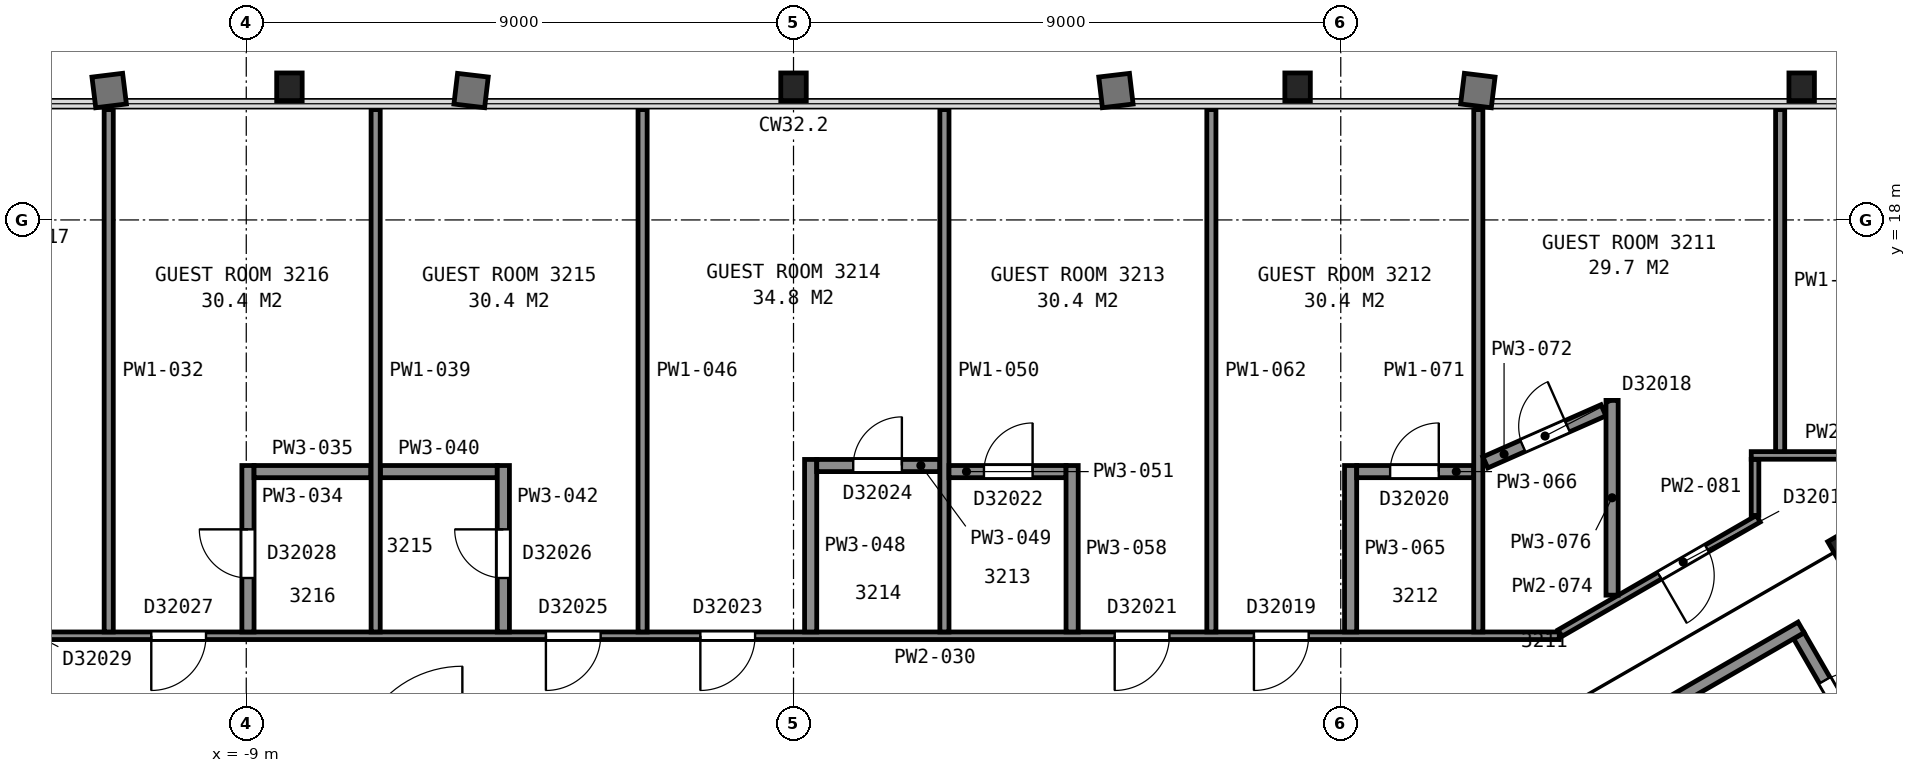
"""IFC4 building model, lengths in metres.
Left out: names, types, materials, properties, quantities, classifications, styles, units other than length and angle.
Written with IfcOpenShell. Run it as: python <this file> out.ifc"""

import sys

from ifc_helpers import new_model, si_unit, direction, frame, frame_2d, origin, origin_2d, place, context, subcontext, project, spatial, rectangle, i_section, extrude, element, fill, save


model = new_model("IFC4")
c1 = context("Model", 3, precision=1e-05, world=origin(), true_north=direction((0.0, 1.0)))
c2 = subcontext(c1, "Body", "Model", "MODEL_VIEW")
j1 = project(units=[si_unit("LENGTHUNIT", "METRE"), si_unit("PLANEANGLEUNIT", "RADIAN")], contexts=[c1])
p1 = place(None, origin())
s1 = spatial("IfcSite", under=j1, at=p1, CompositionType="ELEMENT")
p2 = place(p1, origin())
s2 = spatial("IfcBuilding", under=s1, at=p2, CompositionType="ELEMENT")
p3 = place(p2, frame((0.0, 0.0, 132.4)))
s3 = spatial("IfcBuildingStorey", under=s2, at=p3, CompositionType="ELEMENT", Elevation=132.4)
for number, where, z_axis, x_axis in (
    (1, (16.58, 20.19, 0.04), (0.0, 0.0, 1.0), (1.0, 0.0, 0.0)),
    (2, (8.29, 20.19, 0.04), (0.0, 0.0, 1.0), (1.0, 0.0, 0.0)),
):
    element("IfcColumn", number, at=place(p3, frame(where, z_axis=z_axis, x_axis=x_axis)), inside=s3, PredefinedType="COLUMN", context=c2, shape_type="SweptSolid", body=[
        extrude(i_section(OverallWidth=0.419, OverallDepth=0.455, WebThickness=0.042, FlangeThickness=0.068, FilletRadius=0.015, at=origin_2d()), origin(), (0.0, 0.0, 1.0), 3.56),
    ])
p4 = place(p3, frame((0.0, 20.19, 0.035), z_axis=(0.0, 0.0, 1.0), x_axis=(1.0, 0.0, 0.0)))
e3 = element("IfcColumn", 3, at=p4, inside=s3, PredefinedType="COLUMN", context=c2, shape_type="SweptSolid", body=[
    extrude(i_section(OverallWidth=0.419, OverallDepth=0.455, WebThickness=0.042, FlangeThickness=0.068, FilletRadius=0.015, at=origin_2d()), origin(), (0.0, 0.0, 1.0), 3.565),
])
p5 = place(p3, frame((-8.29, 20.19, 0.04), z_axis=(0.0, 0.0, 1.0), x_axis=(1.0, 0.0, 0.0)))
e4 = element("IfcColumn", 4, at=p5, inside=s3, PredefinedType="COLUMN", context=c2, shape_type="SweptSolid", body=[
    extrude(i_section(OverallWidth=0.419, OverallDepth=0.455, WebThickness=0.042, FlangeThickness=0.068, FilletRadius=0.015, at=origin_2d()), origin(), (0.0, 0.0, 1.0), 3.56),
])
p6 = place(p3, frame((17.3, 12.64, 0.0), z_axis=(0.0, 0.0, 1.0), x_axis=(0.5, -0.866025403784, 0.0)))
e5 = element("IfcColumn", 5, at=p6, inside=s3, PredefinedType="COLUMN", context=c2, shape_type="SweptSolid", body=[
    extrude(i_section(OverallWidth=0.411, OverallDepth=0.434, WebThickness=0.036, FlangeThickness=0.057, FilletRadius=0.015, at=origin_2d()), origin(), (0.0, 0.0, 1.0), 3.6),
])
p7 = place(p3, frame((17.934, 8.738, 0.0), z_axis=(0.0, 0.0, 1.0), x_axis=(-0.49998411664, 0.866034573852, 0.0)))
e6 = element("IfcWall", 6, at=p7, inside=s3, PredefinedType="PARTITIONING", context=c2, shape_type="SweptSolid", body=[
    extrude(rectangle(XDim=2.8, YDim=0.2, at=frame_2d((1.4, 0.0))), origin(), (0.0, 0.0, 1.0), 3.35),
])
p8 = place(p7, frame((0.85, 0.0, 0.0)))
e7 = element("IfcOpeningElement", 7, at=p8, cuts=e6, PredefinedType="OPENING", context=c2, shape_type="SweptSolid", body=[
    extrude(rectangle(XDim=1.1, YDim=2.1, at=frame_2d((0.55, 1.05))), frame((0.0, 0.11, 0.0), z_axis=(0.0, -1.0, 0.0), x_axis=(1.0, 0.0, 0.0)), (0.0, 0.0, 1.0), 0.22),
])
for number, where, z_axis, x_axis in (
    (8, (6.178, 5.299, 0.0), (0.0, 0.0, 1.0), (0.866, 0.5, 0.0)),
    (9, (-6.178, 5.299, 0.0), (0.0, 0.0, 1.0), (-0.866, 0.5, 0.0)),
):
    element("IfcWall", number, at=place(p3, frame(where, z_axis=z_axis, x_axis=x_axis)), inside=s3, PredefinedType="PARTITIONING", context=c2, shape_type="SweptSolid", body=[
        extrude(rectangle(XDim=12.0, YDim=0.2, at=frame_2d((6.0, 0.0))), origin(), (0.0, 0.0, 1.0), 3.35),
    ])
p9 = place(p3, frame((-12.594, 11.161, 0.0), z_axis=(0.0, 0.0, 1.0), x_axis=(1.0, 0.0, 0.0)))
e10 = element("IfcWall", 10, at=p9, inside=s3, PredefinedType="PARTITIONING", context=c2, shape_type="SweptSolid", body=[
    extrude(rectangle(XDim=25.187, YDim=0.125, at=frame_2d((12.594, 0.0))), origin(), (0.0, 0.0, 1.0), 2.613),
])
p10 = place(p9, frame((20.166, 0.0, 0.0)))
e11 = element("IfcOpeningElement", 11, at=p10, cuts=e10, PredefinedType="OPENING", context=c2, shape_type="SweptSolid", body=[
    extrude(rectangle(XDim=0.9, YDim=2.1, at=frame_2d((0.45, 1.05))), frame((0.0, 0.073, 0.0), z_axis=(0.0, -1.0, 0.0), x_axis=(1.0, 0.0, 0.0)), (0.0, 0.0, 1.0), 0.145),
])
p11 = place(p9, frame((17.875, 0.0, 0.0)))
e12 = element("IfcOpeningElement", 12, at=p11, cuts=e10, PredefinedType="OPENING", context=c2, shape_type="SweptSolid", body=[
    extrude(rectangle(XDim=0.9, YDim=2.1, at=frame_2d((0.45, 1.05))), frame((0.0, 0.073, 0.0), z_axis=(0.0, -1.0, 0.0), x_axis=(1.0, 0.0, 0.0)), (0.0, 0.0, 1.0), 0.145),
])
p12 = place(p9, frame((11.062, 0.0, 0.0)))
e13 = element("IfcOpeningElement", 13, at=p12, cuts=e10, PredefinedType="OPENING", context=c2, shape_type="SweptSolid", body=[
    extrude(rectangle(XDim=0.9, YDim=2.1, at=frame_2d((0.45, 1.05))), frame((0.0, 0.073, 0.0), z_axis=(0.0, -1.0, 0.0), x_axis=(1.0, 0.0, 0.0)), (0.0, 0.0, 1.0), 0.145),
])
p13 = place(p9, frame((8.521, 0.0, 0.0)))
e14 = element("IfcOpeningElement", 14, at=p13, cuts=e10, PredefinedType="OPENING", context=c2, shape_type="SweptSolid", body=[
    extrude(rectangle(XDim=0.9, YDim=2.1, at=frame_2d((0.45, 1.05))), frame((0.0, 0.073, 0.0), z_axis=(0.0, -1.0, 0.0), x_axis=(1.0, 0.0, 0.0)), (0.0, 0.0, 1.0), 0.145),
])
p14 = place(p9, frame((2.031, 0.0, 0.0)))
e15 = element("IfcOpeningElement", 15, at=p14, cuts=e10, PredefinedType="OPENING", context=c2, shape_type="SweptSolid", body=[
    extrude(rectangle(XDim=0.9, YDim=2.1, at=frame_2d((0.45, 1.05))), frame((0.0, 0.073, 0.0), z_axis=(0.0, -1.0, 0.0), x_axis=(1.0, 0.0, 0.0)), (0.0, 0.0, 1.0), 0.145),
])
p15 = place(p3, frame((-11.262, 11.223, 0.0), z_axis=(0.0, 0.0, 1.0), x_axis=(0.0, 1.0, 0.0)))
e16 = element("IfcWall", 16, at=p15, inside=s3, PredefinedType="PARTITIONING", context=c2, shape_type="SweptSolid", body=[
    extrude(rectangle(XDim=8.592, YDim=0.15, at=frame_2d((4.296, 0.0))), origin(), (0.0, 0.0, 1.0), 2.613),
])
p16 = place(p3, frame((-8.972, 13.961, 0.0), z_axis=(0.0, 0.0, 1.0), x_axis=(0.0, -1.0, 0.0)))
e17 = element("IfcWall", 17, at=p16, inside=s3, PredefinedType="PARTITIONING", context=c2, shape_type="SweptSolid", body=[
    extrude(rectangle(XDim=2.738, YDim=0.2, at=frame_2d((1.369, 0.0))), origin(), (0.0, 0.0, 1.0), 2.613),
])
p17 = place(p16, frame((1.05, 0.0, 0.0)))
e18 = element("IfcOpeningElement", 18, at=p17, cuts=e17, PredefinedType="OPENING", context=c2, shape_type="SweptSolid", body=[
    extrude(rectangle(XDim=0.8, YDim=2.1, at=frame_2d((0.4, 1.05))), frame((0.0, 0.11, 0.0), z_axis=(0.0, -1.0, 0.0), x_axis=(1.0, 0.0, 0.0)), (0.0, 0.0, 1.0), 0.22),
])
p18 = place(p3, frame((-8.872, 13.861, 0.0), z_axis=(0.0, 0.0, 1.0), x_axis=(1.0, 0.0, 0.0)))
e19 = element("IfcWall", 19, at=p18, inside=s3, PredefinedType="PARTITIONING", context=c2, shape_type="SweptSolid", body=[
    extrude(rectangle(XDim=1.92, YDim=0.2, at=frame_2d((0.96, 0.0))), origin(), (0.0, 0.0, 1.0), 2.613),
])
p19 = place(p3, frame((-6.872, 11.223, 0.0), z_axis=(0.0, 0.0, 1.0), x_axis=(0.0, 1.0, 0.0)))
e20 = element("IfcWall", 20, at=p19, inside=s3, PredefinedType="PARTITIONING", context=c2, shape_type="SweptSolid", body=[
    extrude(rectangle(XDim=8.592, YDim=0.15, at=frame_2d((4.296, 0.0))), origin(), (0.0, 0.0, 1.0), 2.613),
])
p20 = place(p3, frame((-6.792, 13.861, 0.0), z_axis=(0.0, 0.0, 1.0), x_axis=(1.0, 0.0, 0.0)))
e21 = element("IfcWall", 21, at=p20, inside=s3, PredefinedType="PARTITIONING", context=c2, shape_type="SweptSolid", body=[
    extrude(rectangle(XDim=1.92, YDim=0.2, at=frame_2d((0.96, 0.0))), origin(), (0.0, 0.0, 1.0), 2.613),
])
p21 = place(p3, frame((-4.772, 11.223, 0.0), z_axis=(0.0, 0.0, 1.0), x_axis=(0.0, 1.0, 0.0)))
e22 = element("IfcWall", 22, at=p21, inside=s3, PredefinedType="PARTITIONING", context=c2, shape_type="SweptSolid", body=[
    extrude(rectangle(XDim=2.738, YDim=0.2, at=frame_2d((1.369, 0.0))), origin(), (0.0, 0.0, 1.0), 2.613),
])
p22 = place(p21, frame((0.887, 0.0, 0.0)))
e23 = element("IfcOpeningElement", 23, at=p22, cuts=e22, PredefinedType="OPENING", context=c2, shape_type="SweptSolid", body=[
    extrude(rectangle(XDim=0.8, YDim=2.1, at=frame_2d((0.4, 1.05))), frame((0.0, 0.11, 0.0), z_axis=(0.0, -1.0, 0.0), x_axis=(1.0, 0.0, 0.0)), (0.0, 0.0, 1.0), 0.22),
])
p23 = place(p3, frame((-2.482, 11.223, 0.0), z_axis=(0.0, 0.0, 1.0), x_axis=(0.0, 1.0, 0.0)))
e24 = element("IfcWall", 24, at=p23, inside=s3, PredefinedType="PARTITIONING", context=c2, shape_type="SweptSolid", body=[
    extrude(rectangle(XDim=8.592, YDim=0.15, at=frame_2d((4.296, 0.0))), origin(), (0.0, 0.0, 1.0), 2.613),
])
p24 = place(p3, frame((0.282, 11.223, 0.0), z_axis=(0.0, 0.0, 1.0), x_axis=(0.0, 1.0, 0.0)))
e25 = element("IfcWall", 25, at=p24, inside=s3, PredefinedType="PARTITIONING", context=c2, shape_type="SweptSolid", body=[
    extrude(rectangle(XDim=2.838, YDim=0.2, at=frame_2d((1.419, 0.0))), origin(), (0.0, 0.0, 1.0), 2.613),
])
p25 = place(p3, frame((2.407, 13.961, 0.0), z_axis=(0.0, 0.0, 1.0), x_axis=(-1.0, 0.0, 0.0)))
e26 = element("IfcWall", 26, at=p25, inside=s3, PredefinedType="PARTITIONING", context=c2, shape_type="SweptSolid", body=[
    extrude(rectangle(XDim=2.025, YDim=0.2, at=frame_2d((1.012, 0.0))), origin(), (0.0, 0.0, 1.0), 2.613),
])
p26 = place(p25, frame((0.625, 0.0, 0.0)))
e27 = element("IfcOpeningElement", 27, at=p26, cuts=e26, PredefinedType="OPENING", context=c2, shape_type="SweptSolid", body=[
    extrude(rectangle(XDim=0.8, YDim=2.1, at=frame_2d((0.4, 1.05))), frame((0.0, 0.11, 0.0), z_axis=(0.0, -1.0, 0.0), x_axis=(1.0, 0.0, 0.0)), (0.0, 0.0, 1.0), 0.22),
])
p27 = place(p3, frame((2.482, 11.223, 0.0), z_axis=(0.0, 0.0, 1.0), x_axis=(0.0, 1.0, 0.0)))
e28 = element("IfcWall", 28, at=p27, inside=s3, PredefinedType="PARTITIONING", context=c2, shape_type="SweptSolid", body=[
    extrude(rectangle(XDim=8.592, YDim=0.15, at=frame_2d((4.296, 0.0))), origin(), (0.0, 0.0, 1.0), 2.613),
])
p28 = place(p3, frame((4.482, 13.861, 0.0), z_axis=(0.0, 0.0, 1.0), x_axis=(-1.0, 0.0, 0.0)))
e29 = element("IfcWall", 29, at=p28, inside=s3, PredefinedType="PARTITIONING", context=c2, shape_type="SweptSolid", body=[
    extrude(rectangle(XDim=1.925, YDim=0.2, at=frame_2d((0.962, 0.0))), origin(), (0.0, 0.0, 1.0), 2.613),
])
p29 = place(p28, frame((0.55, 0.0, 0.0)))
e30 = element("IfcOpeningElement", 30, at=p29, cuts=e29, PredefinedType="OPENING", context=c2, shape_type="SweptSolid", body=[
    extrude(rectangle(XDim=0.8, YDim=2.1, at=frame_2d((0.4, 1.05))), frame((0.0, 0.11, 0.0), z_axis=(0.0, -1.0, 0.0), x_axis=(1.0, 0.0, 0.0)), (0.0, 0.0, 1.0), 0.22),
])
p30 = place(p3, frame((4.582, 11.223, 0.0), z_axis=(0.0, 0.0, 1.0), x_axis=(0.0, 1.0, 0.0)))
e31 = element("IfcWall", 31, at=p30, inside=s3, PredefinedType="PARTITIONING", context=c2, shape_type="SweptSolid", body=[
    extrude(rectangle(XDim=2.738, YDim=0.2, at=frame_2d((1.369, 0.0))), origin(), (0.0, 0.0, 1.0), 2.613),
])
p31 = place(p3, frame((6.872, 11.223, 0.0), z_axis=(0.0, 0.0, 1.0), x_axis=(0.0, 1.0, 0.0)))
e32 = element("IfcWall", 32, at=p31, inside=s3, PredefinedType="PARTITIONING", context=c2, shape_type="SweptSolid", body=[
    extrude(rectangle(XDim=8.592, YDim=0.15, at=frame_2d((4.296, 0.0))), origin(), (0.0, 0.0, 1.0), 2.613),
])
p32 = place(p3, frame((9.162, 11.223, 0.0), z_axis=(0.0, 0.0, 1.0), x_axis=(0.0, 1.0, 0.0)))
e33 = element("IfcWall", 33, at=p32, inside=s3, PredefinedType="PARTITIONING", context=c2, shape_type="SweptSolid", body=[
    extrude(rectangle(XDim=2.738, YDim=0.2, at=frame_2d((1.369, 0.0))), origin(), (0.0, 0.0, 1.0), 2.613),
])
p33 = place(p3, frame((11.187, 13.861, 0.0), z_axis=(0.0, 0.0, 1.0), x_axis=(-1.0, 0.0, 0.0)))
e34 = element("IfcWall", 34, at=p33, inside=s3, PredefinedType="PARTITIONING", context=c2, shape_type="SweptSolid", body=[
    extrude(rectangle(XDim=1.925, YDim=0.2, at=frame_2d((0.962, 0.0))), origin(), (0.0, 0.0, 1.0), 2.613),
])
p34 = place(p33, frame((0.575, 0.0, 0.0)))
e35 = element("IfcOpeningElement", 35, at=p34, cuts=e34, PredefinedType="OPENING", context=c2, shape_type="SweptSolid", body=[
    extrude(rectangle(XDim=0.8, YDim=2.1, at=frame_2d((0.4, 1.05))), frame((0.0, 0.11, 0.0), z_axis=(0.0, -1.0, 0.0), x_axis=(1.0, 0.0, 0.0)), (0.0, 0.0, 1.0), 0.22),
])
p35 = place(p3, frame((11.262, 11.223, 0.0), z_axis=(0.0, 0.0, 1.0), x_axis=(0.0, 1.0, 0.0)))
e36 = element("IfcWall", 36, at=p35, inside=s3, PredefinedType="PARTITIONING", context=c2, shape_type="SweptSolid", body=[
    extrude(rectangle(XDim=8.592, YDim=0.15, at=frame_2d((4.296, 0.0))), origin(), (0.0, 0.0, 1.0), 2.613),
])
p36 = place(p3, frame((13.32, 14.869, 0.0), z_axis=(0.0, 0.0, 1.0), x_axis=(-0.914870345188, -0.403747757263, 0.0)))
e37 = element("IfcWall", 37, at=p36, inside=s3, PredefinedType="PARTITIONING", context=c2, shape_type="SweptSolid", body=[
    extrude(rectangle(XDim=2.124, YDim=0.2, at=frame_2d((1.062, 0.0))), origin(), (0.0, 0.0, 1.0), 2.613),
])
p37 = place(p36, frame((0.65, 0.0, 0.0)))
e38 = element("IfcOpeningElement", 38, at=p37, cuts=e37, PredefinedType="OPENING", context=c2, shape_type="SweptSolid", body=[
    extrude(rectangle(XDim=0.8, YDim=2.1, at=frame_2d((0.4, 1.05))), frame((0.0, 0.11, 0.0), z_axis=(0.0, -1.0, 0.0), x_axis=(1.0, 0.0, 0.0)), (0.0, 0.0, 1.0), 0.22),
])
p38 = place(p3, frame((12.605, 11.203, 0.0), z_axis=(0.0, 0.0, 1.0), x_axis=(0.866113281362, 0.499847760672, 0.0)))
e39 = element("IfcWall", 39, at=p38, inside=s3, PredefinedType="PARTITIONING", context=c2, shape_type="SweptSolid", body=[
    extrude(rectangle(XDim=3.767, YDim=0.125, at=frame_2d((1.883, 0.0))), origin(), (0.0, 0.0, 1.0), 2.613),
])
p39 = place(p38, frame((1.89, 0.0, 0.0)))
e40 = element("IfcOpeningElement", 40, at=p39, cuts=e39, PredefinedType="OPENING", context=c2, shape_type="SweptSolid", body=[
    extrude(rectangle(XDim=0.9, YDim=2.1, at=frame_2d((0.45, 1.05))), frame((0.0, 0.073, 0.0), z_axis=(0.0, -1.0, 0.0), x_axis=(1.0, 0.0, 0.0)), (0.0, 0.0, 1.0), 0.145),
])
p40 = place(p3, frame((13.462, 11.829, 0.0), z_axis=(0.0, 0.0, 1.0), x_axis=(0.0, 1.0, 0.0)))
e41 = element("IfcWall", 41, at=p40, inside=s3, PredefinedType="PARTITIONING", context=c2, shape_type="SweptSolid", body=[
    extrude(rectangle(XDim=3.203, YDim=0.2, at=frame_2d((1.602, 0.0))), origin(), (0.0, 0.0, 1.0), 2.613),
])
p41 = place(p3, frame((15.813, 13.14, 0.0), z_axis=(0.0, 0.0, 1.0), x_axis=(0.0, 1.0, 0.0)))
e42 = element("IfcWall", 42, at=p41, inside=s3, PredefinedType="PARTITIONING", context=c2, shape_type="SweptSolid", body=[
    extrude(rectangle(XDim=0.922, YDim=0.125, at=frame_2d((0.461, 0.0))), origin(), (0.0, 0.0, 1.0), 2.613),
])
p42 = place(p3, frame((15.75, 14.127, 0.0), z_axis=(0.0, 0.0, 1.0), x_axis=(1.0, 0.0, 0.0)))
e43 = element("IfcWall", 43, at=p42, inside=s3, PredefinedType="PARTITIONING", context=c2, shape_type="SweptSolid", body=[
    extrude(rectangle(XDim=3.099, YDim=0.125, at=frame_2d((1.55, 0.0))), origin(), (0.0, 0.0, 1.0), 2.613),
])
p43 = place(p3, frame((16.226, 14.189, 0.0), z_axis=(0.0, 0.0, 1.0), x_axis=(0.0, 1.0, 0.0)))
e44 = element("IfcWall", 44, at=p43, inside=s3, PredefinedType="PARTITIONING", context=c2, shape_type="SweptSolid", body=[
    extrude(rectangle(XDim=5.625, YDim=0.15, at=frame_2d((2.813, 0.0))), origin(), (0.0, 0.0, 1.0), 2.613),
])
p44 = place(p8, origin())
e45 = element("IfcDoor", 45, at=p44, inside=s3, OperationType="SINGLE_SWING_LEFT", PredefinedType="DOOR", context=c2, shape_type="SweptSolid", body=[
    extrude(rectangle(XDim=1.1, YDim=2.1, at=frame_2d((0.55, 1.05))), frame((0.0, 0.025, 0.0), z_axis=(0.0, -1.0, 0.0), x_axis=(1.0, 0.0, 0.0)), (0.0, 0.0, 1.0), 0.05),
])
fill(e7, e45)
p45 = place(p10, origin())
e46 = element("IfcDoor", 46, at=p45, inside=s3, OperationType="SINGLE_SWING_LEFT", PredefinedType="DOOR", context=c2, shape_type="SweptSolid", body=[
    extrude(rectangle(XDim=0.9, YDim=2.1, at=frame_2d((0.45, 1.05))), frame((0.0, 0.025, 0.0), z_axis=(0.0, -1.0, 0.0), x_axis=(1.0, 0.0, 0.0)), (0.0, 0.0, 1.0), 0.05),
])
fill(e11, e46)
p46 = place(p11, origin())
e47 = element("IfcDoor", 47, at=p46, inside=s3, OperationType="SINGLE_SWING_LEFT", PredefinedType="DOOR", context=c2, shape_type="SweptSolid", body=[
    extrude(rectangle(XDim=0.9, YDim=2.1, at=frame_2d((0.45, 1.05))), frame((0.0, 0.025, 0.0), z_axis=(0.0, -1.0, 0.0), x_axis=(1.0, 0.0, 0.0)), (0.0, 0.0, 1.0), 0.05),
])
fill(e12, e47)
p47 = place(p12, origin())
e48 = element("IfcDoor", 48, at=p47, inside=s3, OperationType="SINGLE_SWING_LEFT", PredefinedType="DOOR", context=c2, shape_type="SweptSolid", body=[
    extrude(rectangle(XDim=0.9, YDim=2.1, at=frame_2d((0.45, 1.05))), frame((0.0, 0.025, 0.0), z_axis=(0.0, -1.0, 0.0), x_axis=(1.0, 0.0, 0.0)), (0.0, 0.0, 1.0), 0.05),
])
fill(e13, e48)
p48 = place(p13, origin())
e49 = element("IfcDoor", 49, at=p48, inside=s3, OperationType="SINGLE_SWING_LEFT", PredefinedType="DOOR", context=c2, shape_type="SweptSolid", body=[
    extrude(rectangle(XDim=0.9, YDim=2.1, at=frame_2d((0.45, 1.05))), frame((0.0, 0.025, 0.0), z_axis=(0.0, -1.0, 0.0), x_axis=(1.0, 0.0, 0.0)), (0.0, 0.0, 1.0), 0.05),
])
fill(e14, e49)
p49 = place(p14, origin())
e50 = element("IfcDoor", 50, at=p49, inside=s3, OperationType="SINGLE_SWING_LEFT", PredefinedType="DOOR", context=c2, shape_type="SweptSolid", body=[
    extrude(rectangle(XDim=0.9, YDim=2.1, at=frame_2d((0.45, 1.05))), frame((0.0, 0.025, 0.0), z_axis=(0.0, -1.0, 0.0), x_axis=(1.0, 0.0, 0.0)), (0.0, 0.0, 1.0), 0.05),
])
fill(e15, e50)
p50 = place(p17, origin())
e51 = element("IfcDoor", 51, at=p50, inside=s3, OperationType="SINGLE_SWING_LEFT", PredefinedType="DOOR", context=c2, shape_type="SweptSolid", body=[
    extrude(rectangle(XDim=0.8, YDim=2.1, at=frame_2d((0.4, 1.05))), frame((0.0, 0.025, 0.0), z_axis=(0.0, -1.0, 0.0), x_axis=(1.0, 0.0, 0.0)), (0.0, 0.0, 1.0), 0.05),
])
fill(e18, e51)
p51 = place(p22, origin())
e52 = element("IfcDoor", 52, at=p51, inside=s3, OperationType="SINGLE_SWING_RIGHT", PredefinedType="DOOR", context=c2, shape_type="SweptSolid", body=[
    extrude(rectangle(XDim=0.8, YDim=2.1, at=frame_2d((0.4, 1.05))), frame((0.0, 0.025, 0.0), z_axis=(0.0, -1.0, 0.0), x_axis=(1.0, 0.0, 0.0)), (0.0, 0.0, 1.0), 0.05),
])
fill(e23, e52)
p52 = place(p26, origin())
e53 = element("IfcDoor", 53, at=p52, inside=s3, OperationType="SINGLE_SWING_LEFT", PredefinedType="DOOR", context=c2, shape_type="SweptSolid", body=[
    extrude(rectangle(XDim=0.8, YDim=2.1, at=frame_2d((0.4, 1.05))), frame((0.0, 0.025, 0.0), z_axis=(0.0, -1.0, 0.0), x_axis=(1.0, 0.0, 0.0)), (0.0, 0.0, 1.0), 0.05),
])
fill(e27, e53)
p53 = place(p29, origin())
e54 = element("IfcDoor", 54, at=p53, inside=s3, OperationType="SINGLE_SWING_LEFT", PredefinedType="DOOR", context=c2, shape_type="SweptSolid", body=[
    extrude(rectangle(XDim=0.8, YDim=2.1, at=frame_2d((0.4, 1.05))), frame((0.0, 0.025, 0.0), z_axis=(0.0, -1.0, 0.0), x_axis=(1.0, 0.0, 0.0)), (0.0, 0.0, 1.0), 0.05),
])
fill(e30, e54)
p54 = place(p34, origin())
e55 = element("IfcDoor", 55, at=p54, inside=s3, OperationType="SINGLE_SWING_LEFT", PredefinedType="DOOR", context=c2, shape_type="SweptSolid", body=[
    extrude(rectangle(XDim=0.8, YDim=2.1, at=frame_2d((0.4, 1.05))), frame((0.0, 0.025, 0.0), z_axis=(0.0, -1.0, 0.0), x_axis=(1.0, 0.0, 0.0)), (0.0, 0.0, 1.0), 0.05),
])
fill(e35, e55)
p55 = place(p37, origin())
e56 = element("IfcDoor", 56, at=p55, inside=s3, OperationType="SINGLE_SWING_LEFT", PredefinedType="DOOR", context=c2, shape_type="SweptSolid", body=[
    extrude(rectangle(XDim=0.8, YDim=2.1, at=frame_2d((0.4, 1.05))), frame((0.0, 0.025, 0.0), z_axis=(0.0, -1.0, 0.0), x_axis=(1.0, 0.0, 0.0)), (0.0, 0.0, 1.0), 0.05),
])
fill(e38, e56)
p56 = place(p39, origin())
e57 = element("IfcDoor", 57, at=p56, inside=s3, OperationType="SINGLE_SWING_LEFT", PredefinedType="DOOR", context=c2, shape_type="SweptSolid", body=[
    extrude(rectangle(XDim=0.9, YDim=2.1, at=frame_2d((0.45, 1.05))), frame((0.0, 0.025, 0.0), z_axis=(0.0, -1.0, 0.0), x_axis=(1.0, 0.0, 0.0)), (0.0, 0.0, 1.0), 0.05),
])
fill(e40, e57)
save(model, sys.argv[1])
